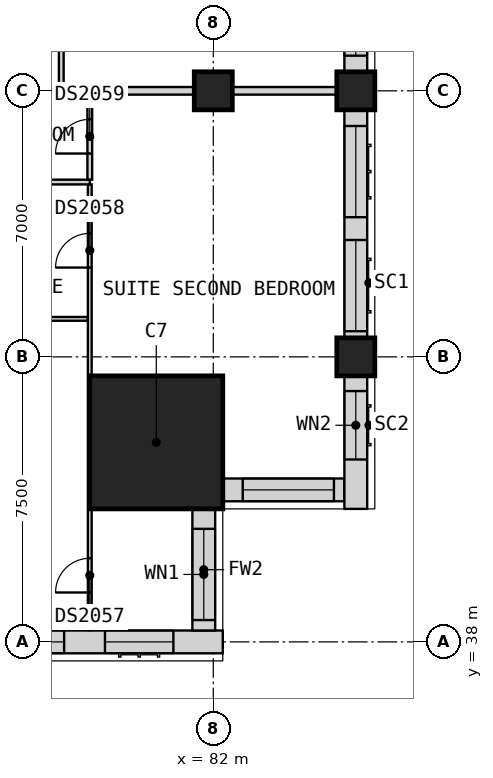
"""IFC4 building model, lengths in metres.
Left out: names, types, materials, properties, quantities, classifications, styles, units other than length and angle.
Written with IfcOpenShell. Run it as: python <this file> out.ifc"""

import sys

from ifc_helpers import new_model, si_unit, direction, frame, frame_2d, origin, origin_2d, place, context, subcontext, project, spatial, rectangle, extrude, element, fill, save


model = new_model("IFC4")
c1 = context("Model", 3, precision=1e-05, world=origin(), true_north=direction((0.0, 1.0)))
c2 = subcontext(c1, "Body", "Model", "MODEL_VIEW")
j1 = project(units=[si_unit("LENGTHUNIT", "METRE"), si_unit("PLANEANGLEUNIT", "RADIAN")], contexts=[c1])
p1 = place(None, origin())
s1 = spatial("IfcSite", under=j1, at=p1, CompositionType="ELEMENT")
p2 = place(p1, origin())
s2 = spatial("IfcBuilding", under=s1, at=p2, CompositionType="ELEMENT")
p3 = place(p2, frame((0.0, 0.0, 133.8)))
s3 = spatial("IfcBuildingStorey", under=s2, at=p3, CompositionType="ELEMENT", Elevation=133.8)
for number, where, z_axis, x_axis in (
    (1, (85.75, 45.5, 0.0), (0.0, 0.0, 1.0), (1.0, 0.0, 0.0)),
    (2, (85.75, 52.5, 0.0), (0.0, 0.0, 1.0), (1.0, 0.0, 0.0)),
    (3, (82.0, 52.5, 0.0), (0.0, 0.0, 1.0), (1.0, 0.0, 0.0)),
):
    element("IfcColumn", number, at=place(p3, frame(where, z_axis=z_axis, x_axis=x_axis)), inside=s3, PredefinedType="COLUMN", context=c2, shape_type="SweptSolid", body=[
        extrude(rectangle(XDim=1.0, YDim=1.0, at=origin_2d()), origin(), (0.0, 0.0, 1.0), 3.6),
    ])
p4 = place(p3, frame((80.5, 43.25, 0.0), z_axis=(0.0, 0.0, 1.0), x_axis=(1.0, 0.0, 0.0)))
e4 = element("IfcColumn", 4, at=p4, inside=s3, PredefinedType="COLUMN", context=c2, shape_type="SweptSolid", body=[
    extrude(rectangle(XDim=3.5, YDim=3.5, at=origin_2d()), origin(), (0.0, 0.0, 1.0), 3.6),
])
p5 = place(p3, frame((75.0, 38.0, 0.0), z_axis=(0.0, 0.0, 1.0), x_axis=(1.0, 0.0, 0.0)))
e5 = element("IfcWall", 5, at=p5, inside=s3, PredefinedType="SOLIDWALL", context=c2, shape_type="SweptSolid", body=[
    extrude(rectangle(XDim=7.25, YDim=0.6, at=frame_2d((3.625, 0.0))), origin(), (0.0, 0.0, 1.0), 2.85),
])
p6 = place(p5, frame((0.675, 0.0, 0.8)))
e6 = element("IfcOpeningElement", 6, at=p6, cuts=e5, PredefinedType="OPENING", context=c2, shape_type="SweptSolid", body=[
    extrude(rectangle(XDim=2.4, YDim=1.8, at=frame_2d((1.2, 0.9))), frame((0.0, 0.31, 0.0), z_axis=(0.0, -1.0, 0.0), x_axis=(1.0, 0.0, 0.0)), (0.0, 0.0, 1.0), 0.62),
])
p7 = place(p5, frame((4.15, 0.0, 0.8)))
e7 = element("IfcOpeningElement", 7, at=p7, cuts=e5, PredefinedType="OPENING", context=c2, shape_type="SweptSolid", body=[
    extrude(rectangle(XDim=1.8, YDim=1.8, at=frame_2d((0.9, 0.9))), frame((0.0, 0.31, 0.0), z_axis=(0.0, -1.0, 0.0), x_axis=(1.0, 0.0, 0.0)), (0.0, 0.0, 1.0), 0.62),
])
p8 = place(p3, frame((81.75, 38.3, 0.0), z_axis=(0.0, 0.0, 1.0), x_axis=(0.0, 1.0, 0.0)))
e8 = element("IfcWall", 8, at=p8, inside=s3, PredefinedType="SOLIDWALL", context=c2, shape_type="SweptSolid", body=[
    extrude(rectangle(XDim=3.2, YDim=0.6, at=frame_2d((1.6, 0.0))), origin(), (0.0, 0.0, 1.0), 3.35),
])
p9 = place(p8, frame((0.275, 0.0, 0.8)))
e9 = element("IfcOpeningElement", 9, at=p9, cuts=e8, PredefinedType="OPENING", context=c2, shape_type="SweptSolid", body=[
    extrude(rectangle(XDim=2.4, YDim=1.8, at=frame_2d((1.2, 0.9))), frame((0.0, 0.31, 0.0), z_axis=(0.0, -1.0, 0.0), x_axis=(1.0, 0.0, 0.0)), (0.0, 0.0, 1.0), 0.62),
])
p10 = place(p3, frame((82.25, 42.0, 0.0), z_axis=(0.0, 0.0, 1.0), x_axis=(1.0, 0.0, 0.0)))
e10 = element("IfcWall", 10, at=p10, inside=s3, PredefinedType="SOLIDWALL", context=c2, shape_type="SweptSolid", body=[
    extrude(rectangle(XDim=3.2, YDim=0.6, at=frame_2d((1.6, 0.0))), origin(), (0.0, 0.0, 1.0), 3.35),
])
p11 = place(p10, frame((0.525, 0.0, 0.8)))
e11 = element("IfcOpeningElement", 11, at=p11, cuts=e10, PredefinedType="OPENING", context=c2, shape_type="SweptSolid", body=[
    extrude(rectangle(XDim=2.4, YDim=1.8, at=frame_2d((1.2, 0.9))), frame((0.0, 0.31, 0.0), z_axis=(0.0, -1.0, 0.0), x_axis=(1.0, 0.0, 0.0)), (0.0, 0.0, 1.0), 0.62),
])
p12 = place(p3, frame((85.75, 41.5, 0.0), z_axis=(0.0, 0.0, 1.0), x_axis=(0.0, 1.0, 0.0)))
e12 = element("IfcWall", 12, at=p12, inside=s3, PredefinedType="SOLIDWALL", context=c2, shape_type="SweptSolid", body=[
    extrude(rectangle(XDim=3.5, YDim=0.6, at=frame_2d((1.75, 0.0))), origin(), (0.0, 0.0, 1.0), 3.35),
])
p13 = place(p12, frame((1.3, 0.0, 0.8)))
e13 = element("IfcOpeningElement", 13, at=p13, cuts=e12, PredefinedType="OPENING", context=c2, shape_type="SweptSolid", body=[
    extrude(rectangle(XDim=1.8, YDim=1.8, at=frame_2d((0.9, 0.9))), frame((0.0, 0.31, 0.0), z_axis=(0.0, -1.0, 0.0), x_axis=(1.0, 0.0, 0.0)), (0.0, 0.0, 1.0), 0.62),
])
p14 = place(p3, frame((85.75, 46.0, 0.0), z_axis=(0.0, 0.0, 1.0), x_axis=(0.0, 1.0, 0.0)))
e14 = element("IfcWall", 14, at=p14, inside=s3, PredefinedType="SOLIDWALL", context=c2, shape_type="SweptSolid", body=[
    extrude(rectangle(XDim=6.0, YDim=0.6, at=frame_2d((3.0, 0.0))), origin(), (0.0, 0.0, 1.0), 2.85),
])
p15 = place(p14, frame((0.175, 0.0, 0.8)))
e15 = element("IfcOpeningElement", 15, at=p15, cuts=e14, PredefinedType="OPENING", context=c2, shape_type="SweptSolid", body=[
    extrude(rectangle(XDim=2.4, YDim=1.8, at=frame_2d((1.2, 0.9))), frame((0.0, 0.31, 0.0), z_axis=(0.0, -1.0, 0.0), x_axis=(1.0, 0.0, 0.0)), (0.0, 0.0, 1.0), 0.62),
])
p16 = place(p14, frame((3.175, 0.0, 0.8)))
e16 = element("IfcOpeningElement", 16, at=p16, cuts=e14, PredefinedType="OPENING", context=c2, shape_type="SweptSolid", body=[
    extrude(rectangle(XDim=2.4, YDim=1.8, at=frame_2d((1.2, 0.9))), frame((0.0, 0.31, 0.0), z_axis=(0.0, -1.0, 0.0), x_axis=(1.0, 0.0, 0.0)), (0.0, 0.0, 1.0), 0.62),
])
p17 = place(p3, frame((85.75, 53.0, 0.0), z_axis=(0.0, 0.0, 1.0), x_axis=(0.0, 1.0, 0.0)))
e17 = element("IfcWall", 17, at=p17, inside=s3, PredefinedType="SOLIDWALL", context=c2, shape_type="SweptSolid", body=[
    extrude(rectangle(XDim=6.5, YDim=0.6, at=frame_2d((3.25, 0.0))), origin(), (0.0, 0.0, 1.0), 2.85),
])
p18 = place(p17, frame((0.425, 0.0, 0.8)))
e18 = element("IfcOpeningElement", 18, at=p18, cuts=e17, PredefinedType="OPENING", context=c2, shape_type="SweptSolid", body=[
    extrude(rectangle(XDim=2.4, YDim=1.8, at=frame_2d((1.2, 0.9))), frame((0.0, 0.31, 0.0), z_axis=(0.0, -1.0, 0.0), x_axis=(1.0, 0.0, 0.0)), (0.0, 0.0, 1.0), 0.62),
])
p19 = place(p17, frame((3.675, 0.0, 0.8)))
e19 = element("IfcOpeningElement", 19, at=p19, cuts=e17, PredefinedType="OPENING", context=c2, shape_type="SweptSolid", body=[
    extrude(rectangle(XDim=2.4, YDim=1.8, at=frame_2d((1.2, 0.9))), frame((0.0, 0.31, 0.0), z_axis=(0.0, -1.0, 0.0), x_axis=(1.0, 0.0, 0.0)), (0.0, 0.0, 1.0), 0.62),
])
p20 = place(p3, frame((73.725, 52.5, 0.0), z_axis=(0.0, 0.0, 1.0), x_axis=(1.0, 0.0, 0.0)))
e20 = element("IfcWall", 20, at=p20, inside=s3, PredefinedType="PARTITIONING", context=c2, shape_type="SweptSolid", body=[
    extrude(rectangle(XDim=12.525, YDim=0.2, at=frame_2d((6.262, 0.0))), origin(), (0.0, 0.0, 1.0), 3.35),
])
p21 = place(p3, frame((78.8, 42.0, 0.0), z_axis=(0.0, 0.0, 1.0), x_axis=(1.0, 0.0, 0.0)))
e21 = element("IfcWall", 21, at=p21, inside=s3, PredefinedType="PARTITIONING", context=c2, shape_type="SweptSolid", body=[
    extrude(rectangle(XDim=3.44, YDim=0.1, at=frame_2d((1.72, 0.0))), origin(), (0.0, 0.0, 1.0), 3.35),
])
p22 = place(p3, frame((71.35, 46.5, 0.0), z_axis=(0.0, 0.0, 1.0), x_axis=(1.0, 0.0, 0.0)))
e22 = element("IfcWall", 22, at=p22, inside=s3, PredefinedType="PARTITIONING", context=c2, shape_type="SweptSolid", body=[
    extrude(rectangle(XDim=7.35, YDim=0.1, at=frame_2d((3.675, 0.0))), origin(), (0.0, 0.0, 1.0), 3.35),
])
p23 = place(p22, frame((0.65, 0.0, 0.0)))
e23 = element("IfcOpeningElement", 23, at=p23, cuts=e22, PredefinedType="OPENING", context=c2, shape_type="SweptSolid", body=[
    extrude(rectangle(XDim=0.9, YDim=2.1, at=frame_2d((0.45, 1.05))), frame((0.0, 0.06, 0.0), z_axis=(0.0, -1.0, 0.0), x_axis=(1.0, 0.0, 0.0)), (0.0, 0.0, 1.0), 0.12),
])
p24 = place(p3, frame((78.75, 38.31, 0.0), z_axis=(0.0, 0.0, 1.0), x_axis=(0.0, 1.0, 0.0)))
e24 = element("IfcWall", 24, at=p24, inside=s3, PredefinedType="PARTITIONING", context=c2, shape_type="SweptSolid", body=[
    extrude(rectangle(XDim=11.728, YDim=0.1, at=frame_2d((5.864, 0.0))), origin(), (0.0, 0.0, 1.0), 3.35),
])
p25 = place(p24, frame((0.99, 0.0, 0.0)))
e25 = element("IfcOpeningElement", 25, at=p25, cuts=e24, PredefinedType="OPENING", context=c2, shape_type="SweptSolid", body=[
    extrude(rectangle(XDim=0.9, YDim=2.1, at=frame_2d((0.45, 1.05))), frame((0.0, 0.06, 0.0), z_axis=(0.0, -1.0, 0.0), x_axis=(1.0, 0.0, 0.0)), (0.0, 0.0, 1.0), 0.12),
])
p26 = place(p24, frame((9.54, 0.0, 0.0)))
e26 = element("IfcOpeningElement", 26, at=p26, cuts=e24, PredefinedType="OPENING", context=c2, shape_type="SweptSolid", body=[
    extrude(rectangle(XDim=0.9, YDim=2.1, at=frame_2d((0.45, 1.05))), frame((0.0, 0.06, 0.0), z_axis=(0.0, -1.0, 0.0), x_axis=(1.0, 0.0, 0.0)), (0.0, 0.0, 1.0), 0.12),
])
p27 = place(p3, frame((73.725, 50.1, 0.0), z_axis=(0.0, 0.0, 1.0), x_axis=(1.0, 0.0, 0.0)))
e27 = element("IfcWall", 27, at=p27, inside=s3, PredefinedType="PARTITIONING", context=c2, shape_type="SweptSolid", body=[
    extrude(rectangle(XDim=5.025, YDim=0.125, at=frame_2d((2.512, 0.0))), origin(), (0.0, 0.0, 1.0), 3.35),
])
p28 = place(p3, frame((78.0, 52.6, 0.0), z_axis=(0.0, 0.0, 1.0), x_axis=(0.0, 1.0, 0.0)))
e28 = element("IfcWall", 28, at=p28, inside=s3, PredefinedType="PARTITIONING", context=c2, shape_type="SweptSolid", body=[
    extrude(rectangle(XDim=4.337, YDim=0.125, at=frame_2d((2.169, 0.0))), origin(), (0.0, 0.0, 1.0), 3.35),
])
p29 = place(p28, frame((1.7, 0.0, 0.0)))
e29 = element("IfcOpeningElement", 29, at=p29, cuts=e28, PredefinedType="OPENING", context=c2, shape_type="SweptSolid", body=[
    extrude(rectangle(XDim=0.9, YDim=2.1, at=frame_2d((0.45, 1.05))), frame((0.0, 0.073, 0.0), z_axis=(0.0, -1.0, 0.0), x_axis=(1.0, 0.0, 0.0)), (0.0, 0.0, 1.0), 0.145),
])
p30 = place(p3, frame((78.75, 50.163, 0.0), z_axis=(0.0, 0.0, 1.0), x_axis=(0.0, 1.0, 0.0)))
e30 = element("IfcWall", 30, at=p30, inside=s3, PredefinedType="PARTITIONING", context=c2, shape_type="SweptSolid", body=[
    extrude(rectangle(XDim=2.237, YDim=0.125, at=frame_2d((1.119, 0.0))), origin(), (0.0, 0.0, 1.0), 3.35),
])
p31 = place(p30, frame((0.688, 0.0, 0.0)))
e31 = element("IfcOpeningElement", 31, at=p31, cuts=e30, PredefinedType="OPENING", context=c2, shape_type="SweptSolid", body=[
    extrude(rectangle(XDim=0.9, YDim=2.1, at=frame_2d((0.45, 1.05))), frame((0.0, 0.073, 0.0), z_axis=(0.0, -1.0, 0.0), x_axis=(1.0, 0.0, 0.0)), (0.0, 0.0, 1.0), 0.145),
])
p32 = place(p6, origin())
e32 = element("IfcWindow", 32, at=p32, inside=s3, PartitioningType="SINGLE_PANEL", PredefinedType="WINDOW", context=c2, shape_type="SweptSolid", body=[
    extrude(rectangle(XDim=2.4, YDim=1.8, at=frame_2d((1.2, 0.9))), frame((0.0, -0.07, 0.0), z_axis=(0.0, -1.0, 0.0), x_axis=(1.0, 0.0, 0.0)), (0.0, 0.0, 1.0), 0.06),
])
fill(e6, e32)
p33 = place(p7, origin())
e33 = element("IfcWindow", 33, at=p33, inside=s3, PartitioningType="SINGLE_PANEL", PredefinedType="WINDOW", context=c2, shape_type="SweptSolid", body=[
    extrude(rectangle(XDim=1.8, YDim=1.8, at=frame_2d((0.9, 0.9))), frame((0.0, -0.07, 0.0), z_axis=(0.0, -1.0, 0.0), x_axis=(1.0, 0.0, 0.0)), (0.0, 0.0, 1.0), 0.06),
])
fill(e7, e33)
p34 = place(p9, origin())
e34 = element("IfcWindow", 34, at=p34, inside=s3, PartitioningType="SINGLE_PANEL", PredefinedType="WINDOW", context=c2, shape_type="SweptSolid", body=[
    extrude(rectangle(XDim=2.4, YDim=1.8, at=frame_2d((1.2, 0.9))), frame((0.0, -0.07, 0.0), z_axis=(0.0, -1.0, 0.0), x_axis=(1.0, 0.0, 0.0)), (0.0, 0.0, 1.0), 0.06),
])
fill(e9, e34)
p35 = place(p11, origin())
e35 = element("IfcWindow", 35, at=p35, inside=s3, PartitioningType="SINGLE_PANEL", PredefinedType="WINDOW", context=c2, shape_type="SweptSolid", body=[
    extrude(rectangle(XDim=2.4, YDim=1.8, at=frame_2d((1.2, 0.9))), frame((0.0, -0.07, 0.0), z_axis=(0.0, -1.0, 0.0), x_axis=(1.0, 0.0, 0.0)), (0.0, 0.0, 1.0), 0.06),
])
fill(e11, e35)
p36 = place(p13, origin())
e36 = element("IfcWindow", 36, at=p36, inside=s3, PartitioningType="SINGLE_PANEL", PredefinedType="WINDOW", context=c2, shape_type="SweptSolid", body=[
    extrude(rectangle(XDim=1.8, YDim=1.8, at=frame_2d((0.9, 0.9))), frame((0.0, -0.07, 0.0), z_axis=(0.0, -1.0, 0.0), x_axis=(1.0, 0.0, 0.0)), (0.0, 0.0, 1.0), 0.06),
])
fill(e13, e36)
p37 = place(p15, origin())
e37 = element("IfcWindow", 37, at=p37, inside=s3, PartitioningType="SINGLE_PANEL", PredefinedType="WINDOW", context=c2, shape_type="SweptSolid", body=[
    extrude(rectangle(XDim=2.4, YDim=1.8, at=frame_2d((1.2, 0.9))), frame((0.0, -0.07, 0.0), z_axis=(0.0, -1.0, 0.0), x_axis=(1.0, 0.0, 0.0)), (0.0, 0.0, 1.0), 0.06),
])
fill(e15, e37)
p38 = place(p16, origin())
e38 = element("IfcWindow", 38, at=p38, inside=s3, PartitioningType="SINGLE_PANEL", PredefinedType="WINDOW", context=c2, shape_type="SweptSolid", body=[
    extrude(rectangle(XDim=2.4, YDim=1.8, at=frame_2d((1.2, 0.9))), frame((0.0, -0.07, 0.0), z_axis=(0.0, -1.0, 0.0), x_axis=(1.0, 0.0, 0.0)), (0.0, 0.0, 1.0), 0.06),
])
fill(e16, e38)
p39 = place(p18, origin())
e39 = element("IfcWindow", 39, at=p39, inside=s3, PartitioningType="SINGLE_PANEL", PredefinedType="WINDOW", context=c2, shape_type="SweptSolid", body=[
    extrude(rectangle(XDim=2.4, YDim=1.8, at=frame_2d((1.2, 0.9))), frame((0.0, -0.07, 0.0), z_axis=(0.0, -1.0, 0.0), x_axis=(1.0, 0.0, 0.0)), (0.0, 0.0, 1.0), 0.06),
])
fill(e18, e39)
p40 = place(p25, origin())
e40 = element("IfcDoor", 40, at=p40, inside=s3, OperationType="SINGLE_SWING_LEFT", PredefinedType="DOOR", context=c2, shape_type="SweptSolid", body=[
    extrude(rectangle(XDim=0.9, YDim=2.1, at=frame_2d((0.45, 1.05))), frame((0.0, 0.025, 0.0), z_axis=(0.0, -1.0, 0.0), x_axis=(1.0, 0.0, 0.0)), (0.0, 0.0, 1.0), 0.05),
])
fill(e25, e40)
p41 = place(p26, origin())
e41 = element("IfcDoor", 41, at=p41, inside=s3, OperationType="SINGLE_SWING_RIGHT", PredefinedType="DOOR", context=c2, shape_type="SweptSolid", body=[
    extrude(rectangle(XDim=0.9, YDim=2.1, at=frame_2d((0.45, 1.05))), frame((0.0, 0.025, 0.0), z_axis=(0.0, -1.0, 0.0), x_axis=(1.0, 0.0, 0.0)), (0.0, 0.0, 1.0), 0.05),
])
fill(e26, e41)
p42 = place(p31, origin())
e42 = element("IfcDoor", 42, at=p42, inside=s3, OperationType="SINGLE_SWING_LEFT", PredefinedType="DOOR", context=c2, shape_type="SweptSolid", body=[
    extrude(rectangle(XDim=0.9, YDim=2.1, at=frame_2d((0.45, 1.05))), frame((0.0, 0.025, 0.0), z_axis=(0.0, -1.0, 0.0), x_axis=(1.0, 0.0, 0.0)), (0.0, 0.0, 1.0), 0.05),
])
fill(e31, e42)
save(model, sys.argv[1])
